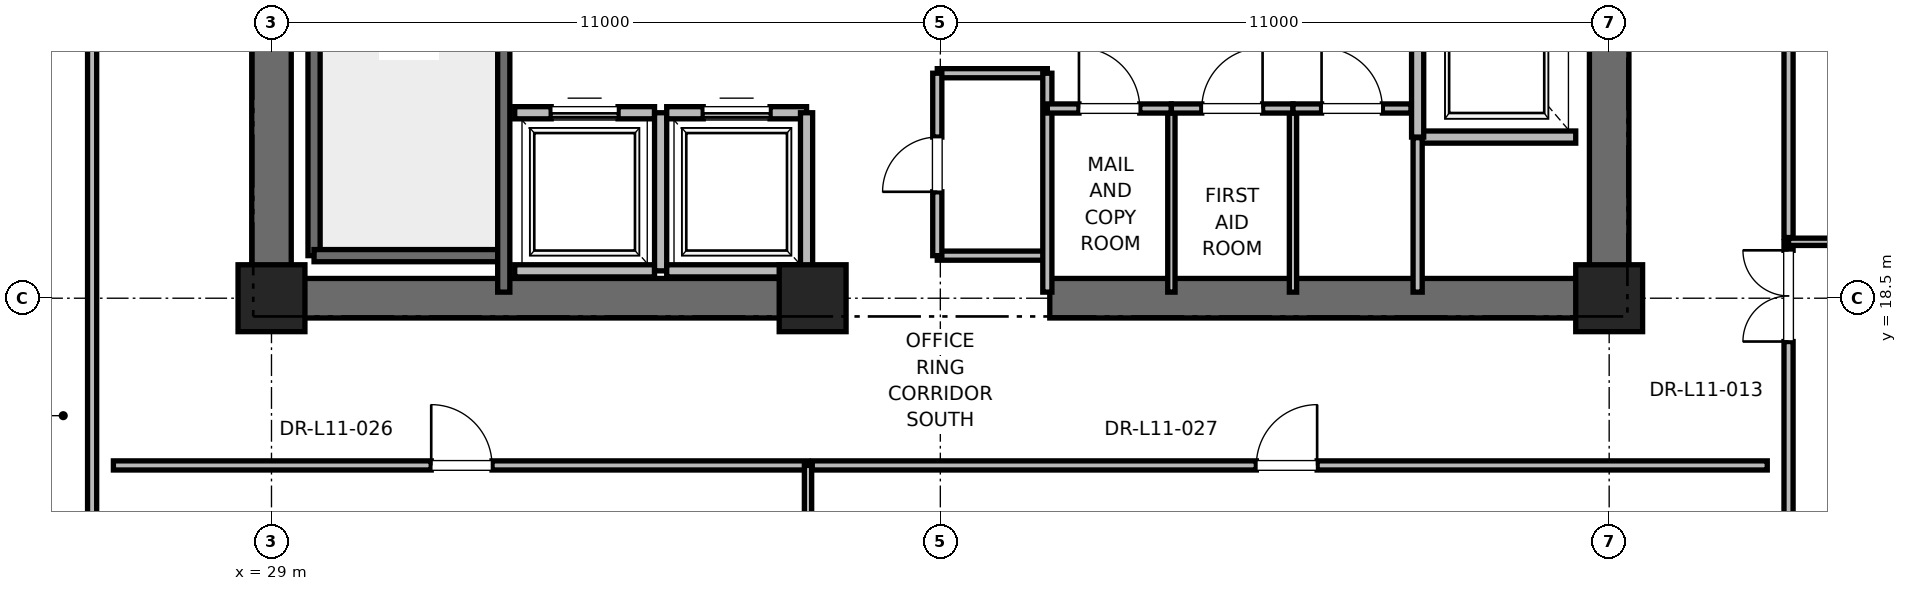
"""IFC4 building model, lengths in metres.
Left out: names, types, materials, properties, quantities, classifications, styles, units other than length and angle.
Written with IfcOpenShell. Run it as: python <this file> out.ifc"""

import sys

from ifc_helpers import new_model, si_unit, direction, frame, frame_2d, origin, origin_2d, place, context, subcontext, project, spatial, rectangle, extrude, element, fill, save


model = new_model("IFC4")
c1 = context("Model", 3, precision=1e-05, world=origin(), true_north=direction((0.0, 1.0)))
c2 = subcontext(c1, "Body", "Model", "MODEL_VIEW")
j1 = project(units=[si_unit("LENGTHUNIT", "METRE"), si_unit("PLANEANGLEUNIT", "RADIAN")], contexts=[c1])
p1 = place(None, origin())
s1 = spatial("IfcSite", under=j1, at=p1, CompositionType="ELEMENT")
p2 = place(p1, origin())
s2 = spatial("IfcBuilding", under=s1, at=p2, CompositionType="ELEMENT")
p3 = place(p2, frame((0.0, 0.0, 51.6)))
s3 = spatial("IfcBuildingStorey", under=s2, at=p3, CompositionType="ELEMENT", Elevation=51.6)
for number, where, z_axis, x_axis in (
    (1, (29.0, 18.5, 0.0), (0.0, 0.0, 1.0), (1.0, 0.0, 0.0)),
    (2, (51.0, 18.5, 0.0), (0.0, 0.0, 1.0), (1.0, 0.0, 0.0)),
    (3, (37.9, 18.5, 0.0), (0.0, 0.0, 1.0), (1.0, 0.0, 0.0)),
):
    element("IfcColumn", number, at=place(p3, frame(where, z_axis=z_axis, x_axis=x_axis)), inside=s3, PredefinedType="PILASTER", context=c2, shape_type="SweptSolid", body=[
        extrude(rectangle(XDim=1.1, YDim=1.1, at=origin_2d()), origin(), (0.0, 0.0, 1.0), 4.0),
    ])
for number, where, z_axis, x_axis in (
    (4, (29.0, 18.5, 0.0), (0.0, 0.0, 1.0), (1.0, 0.0, 0.0)),
    (5, (41.8, 18.5, 0.0), (0.0, 0.0, 1.0), (1.0, 0.0, 0.0)),
):
    element("IfcWall", number, at=place(p3, frame(where, z_axis=z_axis, x_axis=x_axis)), inside=s3, PredefinedType="SHEAR", context=c2, shape_type="SweptSolid", body=[
        extrude(rectangle(XDim=9.2, YDim=0.65, at=frame_2d((4.6, 0.0))), origin(), (0.0, 0.0, 1.0), 3.76),
    ])
p4 = place(p3, frame((29.0, 18.5, 0.0), z_axis=(0.0, 0.0, 1.0), x_axis=(0.0, 1.0, 0.0)))
e6 = element("IfcWall", 6, at=p4, inside=s3, PredefinedType="SHEAR", context=c2, shape_type="SweptSolid", body=[
    extrude(rectangle(XDim=8.8, YDim=0.65, at=frame_2d((4.4, 0.0))), origin(), (0.0, 0.0, 1.0), 3.76),
])
p5 = place(p3, frame((51.0, 18.5, 0.0), z_axis=(0.0, 0.0, 1.0), x_axis=(0.0, 1.0, 0.0)))
e7 = element("IfcWall", 7, at=p5, inside=s3, PredefinedType="SHEAR", context=c2, shape_type="SweptSolid", body=[
    extrude(rectangle(XDim=5.8, YDim=0.65, at=frame_2d((2.9, 0.0))), origin(), (0.0, 0.0, 1.0), 3.76),
])
p6 = place(p3, frame((29.7, 19.2, 0.0), z_axis=(0.0, 0.0, 1.0), x_axis=(0.0, 1.0, 0.0)))
e8 = element("IfcWall", 8, at=p6, inside=s3, PredefinedType="SOLIDWALL", context=c2, shape_type="SweptSolid", body=[
    extrude(rectangle(XDim=8.15, YDim=0.2, at=frame_2d((4.075, 0.0))), origin(), (0.0, 0.0, 1.0), 3.76),
])
p7 = place(p3, frame((29.7, 19.2, 0.0), z_axis=(0.0, 0.0, 1.0), x_axis=(1.0, 0.0, 0.0)))
e9 = element("IfcWall", 9, at=p7, inside=s3, PredefinedType="SOLIDWALL", context=c2, shape_type="SweptSolid", body=[
    extrude(rectangle(XDim=3.12, YDim=0.2, at=frame_2d((1.56, 0.0))), origin(), (0.0, 0.0, 1.0), 3.76),
])
p8 = place(p3, frame((32.82, 18.6, 0.0), z_axis=(0.0, 0.0, 1.0), x_axis=(0.0, 1.0, 0.0)))
e10 = element("IfcWall", 10, at=p8, inside=s3, PredefinedType="SOLIDWALL", context=c2, shape_type="SweptSolid", body=[
    extrude(rectangle(XDim=8.78, YDim=0.2, at=frame_2d((4.39, 0.0))), origin(), (0.0, 0.0, 1.0), 3.76),
])
p9 = place(p3, frame((47.85, 21.15, 0.0), z_axis=(0.0, 0.0, 1.0), x_axis=(1.0, 0.0, 0.0)))
e11 = element("IfcWall", 11, at=p9, inside=s3, PredefinedType="SOLIDWALL", context=c2, shape_type="SweptSolid", body=[
    extrude(rectangle(XDim=2.6, YDim=0.2, at=frame_2d((1.3, 0.0))), origin(), (0.0, 0.0, 1.0), 3.76),
])
p10 = place(p3, frame((47.85, 24.15, 0.0), z_axis=(0.0, 0.0, 1.0), x_axis=(0.0, -1.0, 0.0)))
e12 = element("IfcWall", 12, at=p10, inside=s3, PredefinedType="SOLIDWALL", context=c2, shape_type="SweptSolid", body=[
    extrude(rectangle(XDim=3.0, YDim=0.2, at=frame_2d((1.5, 0.0))), origin(), (0.0, 0.0, 1.0), 3.76),
])
p11 = place(p3, frame((33.0, 18.95, 0.0), z_axis=(0.0, 0.0, 1.0), x_axis=(1.0, 0.0, 0.0)))
e13 = element("IfcWall", 13, at=p11, inside=s3, PredefinedType="SOLIDWALL", context=c2, shape_type="SweptSolid", body=[
    extrude(rectangle(XDim=2.3, YDim=0.2, at=frame_2d((1.15, 0.0))), origin(), (0.0, 0.0, 1.0), 3.76),
])
p12 = place(p3, frame((35.3, 21.55, 0.0), z_axis=(0.0, 0.0, 1.0), x_axis=(-1.0, 0.0, 0.0)))
e14 = element("IfcWall", 14, at=p12, inside=s3, PredefinedType="SOLIDWALL", context=c2, shape_type="SweptSolid", body=[
    extrude(rectangle(XDim=2.3, YDim=0.2, at=frame_2d((1.15, 0.0))), origin(), (0.0, 0.0, 1.0), 3.76),
])
p13 = place(p12, frame((0.6, 0.0, 0.0)))
e15 = element("IfcOpeningElement", 15, at=p13, cuts=e14, PredefinedType="OPENING", context=c2, shape_type="SweptSolid", body=[
    extrude(rectangle(XDim=1.1, YDim=2.2, at=frame_2d((0.55, 1.1))), frame((0.0, 0.1, 0.0), z_axis=(0.0, -1.0, 0.0), x_axis=(1.0, 0.0, 0.0)), (0.0, 0.0, 1.0), 0.2),
])
p14 = place(p3, frame((35.4, 18.95, 0.0), z_axis=(0.0, 0.0, 1.0), x_axis=(0.0, 1.0, 0.0)))
e16 = element("IfcWall", 16, at=p14, inside=s3, PredefinedType="SOLIDWALL", context=c2, shape_type="SweptSolid", body=[
    extrude(rectangle(XDim=2.6, YDim=0.2, at=frame_2d((1.3, 0.0))), origin(), (0.0, 0.0, 1.0), 3.76),
])
p15 = place(p3, frame((35.5, 18.95, 0.0), z_axis=(0.0, 0.0, 1.0), x_axis=(1.0, 0.0, 0.0)))
e17 = element("IfcWall", 17, at=p15, inside=s3, PredefinedType="SOLIDWALL", context=c2, shape_type="SweptSolid", body=[
    extrude(rectangle(XDim=2.3, YDim=0.2, at=frame_2d((1.15, 0.0))), origin(), (0.0, 0.0, 1.0), 2.54),
])
p16 = place(p3, frame((37.8, 21.55, 0.0), z_axis=(0.0, 0.0, 1.0), x_axis=(-1.0, 0.0, 0.0)))
e18 = element("IfcWall", 18, at=p16, inside=s3, PredefinedType="SOLIDWALL", context=c2, shape_type="SweptSolid", body=[
    extrude(rectangle(XDim=2.3, YDim=0.2, at=frame_2d((1.15, 0.0))), origin(), (0.0, 0.0, 1.0), 3.76),
])
p17 = place(p16, frame((0.6, 0.0, 0.0)))
e19 = element("IfcOpeningElement", 19, at=p17, cuts=e18, PredefinedType="OPENING", context=c2, shape_type="SweptSolid", body=[
    extrude(rectangle(XDim=1.1, YDim=2.2, at=frame_2d((0.55, 1.1))), frame((0.0, 0.1, 0.0), z_axis=(0.0, -1.0, 0.0), x_axis=(1.0, 0.0, 0.0)), (0.0, 0.0, 1.0), 0.2),
])
p18 = place(p3, frame((37.8, 18.95, 0.0), z_axis=(0.0, 0.0, 1.0), x_axis=(0.0, 1.0, 0.0)))
e20 = element("IfcWall", 20, at=p18, inside=s3, PredefinedType="SOLIDWALL", context=c2, shape_type="SweptSolid", body=[
    extrude(rectangle(XDim=2.6, YDim=0.2, at=frame_2d((1.3, 0.0))), origin(), (0.0, 0.0, 1.0), 2.54),
])
for number, where, z_axis, x_axis in (
    (21, (39.95, 19.2, 0.0), (0.0, 0.0, 1.0), (1.0, 0.0, 0.0)),
    (22, (39.95, 22.2, 0.0), (0.0, 0.0, 1.0), (1.0, 0.0, 0.0)),
):
    element("IfcWall", number, at=place(p3, frame(where, z_axis=z_axis, x_axis=x_axis)), inside=s3, PredefinedType="PARTITIONING", context=c2, shape_type="SweptSolid", body=[
        extrude(rectangle(XDim=1.81, YDim=0.15, at=frame_2d((0.905, 0.0))), origin(), (0.0, 0.0, 1.0), 2.85),
    ])
p19 = place(p3, frame((41.76, 18.6, 0.0), z_axis=(0.0, 0.0, 1.0), x_axis=(0.0, 1.0, 0.0)))
e23 = element("IfcWall", 23, at=p19, inside=s3, PredefinedType="PARTITIONING", context=c2, shape_type="SweptSolid", body=[
    extrude(rectangle(XDim=3.6, YDim=0.15, at=frame_2d((1.8, 0.0))), origin(), (0.0, 0.0, 1.0), 2.54),
])
p20 = place(p3, frame((39.95, 19.2, 0.0), z_axis=(0.0, 0.0, 1.0), x_axis=(0.0, 1.0, 0.0)))
e24 = element("IfcWall", 24, at=p20, inside=s3, PredefinedType="PARTITIONING", context=c2, shape_type="SweptSolid", body=[
    extrude(rectangle(XDim=3.0, YDim=0.15, at=frame_2d((1.5, 0.0))), origin(), (0.0, 0.0, 1.0), 2.85),
])
p21 = place(p20, frame((1.05, 0.0, 0.0)))
e25 = element("IfcOpeningElement", 25, at=p21, cuts=e24, PredefinedType="OPENING", context=c2, shape_type="SweptSolid", body=[
    extrude(rectangle(XDim=0.9, YDim=2.1, at=frame_2d((0.45, 1.05))), frame((0.0, 0.075, 0.0), z_axis=(0.0, -1.0, 0.0), x_axis=(1.0, 0.0, 0.0)), (0.0, 0.0, 1.0), 0.15),
])
p22 = place(p3, frame((47.85, 18.6, 0.0), z_axis=(0.0, 0.0, 1.0), x_axis=(0.0, 1.0, 0.0)))
e26 = element("IfcWall", 26, at=p22, inside=s3, PredefinedType="PARTITIONING", context=c2, shape_type="SweptSolid", body=[
    extrude(rectangle(XDim=2.54, YDim=0.15, at=frame_2d((1.27, 0.0))), origin(), (0.0, 0.0, 1.0), 2.85),
])
for number, where, z_axis, x_axis in (
    (27, (43.8, 18.6, 0.0), (0.0, 0.0, 1.0), (0.0, 1.0, 0.0)),
    (28, (45.8, 18.6, 0.0), (0.0, 0.0, 1.0), (0.0, 1.0, 0.0)),
):
    element("IfcWall", number, at=place(p3, frame(where, z_axis=z_axis, x_axis=x_axis)), inside=s3, PredefinedType="PARTITIONING", context=c2, shape_type="SweptSolid", body=[
        extrude(rectangle(XDim=3.02, YDim=0.12, at=frame_2d((1.51, 0.0))), origin(), (0.0, 0.0, 1.0), 2.85),
    ])
p23 = place(p3, frame((41.76, 21.62, 0.0), z_axis=(0.0, 0.0, 1.0), x_axis=(1.0, 0.0, 0.0)))
e29 = element("IfcWall", 29, at=p23, inside=s3, PredefinedType="PARTITIONING", context=c2, shape_type="SweptSolid", body=[
    extrude(rectangle(XDim=2.04, YDim=0.15, at=frame_2d((1.02, 0.0))), origin(), (0.0, 0.0, 1.0), 2.85),
])
p24 = place(p23, frame((0.52, 0.0, 0.0)))
e30 = element("IfcOpeningElement", 30, at=p24, cuts=e29, PredefinedType="OPENING", context=c2, shape_type="SweptSolid", body=[
    extrude(rectangle(XDim=1.0, YDim=2.15, at=frame_2d((0.5, 1.075))), frame((0.0, 0.075, 0.0), z_axis=(0.0, -1.0, 0.0), x_axis=(1.0, 0.0, 0.0)), (0.0, 0.0, 1.0), 0.15),
])
p25 = place(p3, frame((43.8, 21.62, 0.0), z_axis=(0.0, 0.0, 1.0), x_axis=(1.0, 0.0, 0.0)))
e31 = element("IfcWall", 31, at=p25, inside=s3, PredefinedType="PARTITIONING", context=c2, shape_type="SweptSolid", body=[
    extrude(rectangle(XDim=2.0, YDim=0.15, at=frame_2d((1.0, 0.0))), origin(), (0.0, 0.0, 1.0), 2.85),
])
p26 = place(p25, frame((0.5, 0.0, 0.0)))
e32 = element("IfcOpeningElement", 32, at=p26, cuts=e31, PredefinedType="OPENING", context=c2, shape_type="SweptSolid", body=[
    extrude(rectangle(XDim=1.0, YDim=2.15, at=frame_2d((0.5, 1.075))), frame((0.0, 0.075, 0.0), z_axis=(0.0, -1.0, 0.0), x_axis=(1.0, 0.0, 0.0)), (0.0, 0.0, 1.0), 0.15),
])
p27 = place(p3, frame((45.8, 21.62, 0.0), z_axis=(0.0, 0.0, 1.0), x_axis=(1.0, 0.0, 0.0)))
e33 = element("IfcWall", 33, at=p27, inside=s3, PredefinedType="PARTITIONING", context=c2, shape_type="SweptSolid", body=[
    extrude(rectangle(XDim=1.94, YDim=0.15, at=frame_2d((0.97, 0.0))), origin(), (0.0, 0.0, 1.0), 2.85),
])
p28 = place(p27, frame((0.47, 0.0, 0.0)))
e34 = element("IfcOpeningElement", 34, at=p28, cuts=e33, PredefinedType="OPENING", context=c2, shape_type="SweptSolid", body=[
    extrude(rectangle(XDim=1.0, YDim=2.15, at=frame_2d((0.5, 1.075))), frame((0.0, 0.075, 0.0), z_axis=(0.0, -1.0, 0.0), x_axis=(1.0, 0.0, 0.0)), (0.0, 0.0, 1.0), 0.15),
])
p29 = place(p3, frame((26.4, 15.75, 0.0), z_axis=(0.0, 0.0, 1.0), x_axis=(1.0, 0.0, 0.0)))
e35 = element("IfcWall", 35, at=p29, inside=s3, PredefinedType="PARTITIONING", context=c2, shape_type="SweptSolid", body=[
    extrude(rectangle(XDim=11.424, YDim=0.15, at=frame_2d((5.712, 0.0))), origin(), (0.0, 0.0, 1.0), 2.85),
])
p30 = place(p29, frame((5.227, 0.0, 0.0)))
e36 = element("IfcOpeningElement", 36, at=p30, cuts=e35, PredefinedType="OPENING", context=c2, shape_type="SweptSolid", body=[
    extrude(rectangle(XDim=1.0, YDim=2.15, at=frame_2d((0.5, 1.075))), frame((0.0, 0.075, 0.0), z_axis=(0.0, -1.0, 0.0), x_axis=(1.0, 0.0, 0.0)), (0.0, 0.0, 1.0), 0.15),
])
p31 = place(p3, frame((37.824, 5.454, 0.0), z_axis=(0.0, 0.0, 1.0), x_axis=(0.0, 1.0, 0.0)))
e37 = element("IfcWall", 37, at=p31, inside=s3, PredefinedType="PARTITIONING", context=c2, shape_type="SweptSolid", body=[
    extrude(rectangle(XDim=10.296, YDim=0.12, at=frame_2d((5.148, 0.0))), origin(), (0.0, 0.0, 1.0), 2.39),
])
p32 = place(p3, frame((37.894, 15.75, 0.0), z_axis=(0.0, 0.0, 1.0), x_axis=(1.0, 0.0, 0.0)))
e38 = element("IfcWall", 38, at=p32, inside=s3, PredefinedType="PARTITIONING", context=c2, shape_type="SweptSolid", body=[
    extrude(rectangle(XDim=15.706, YDim=0.15, at=frame_2d((7.853, 0.0))), origin(), (0.0, 0.0, 1.0), 2.85),
])
p33 = place(p32, frame((7.303, 0.0, 0.0)))
e39 = element("IfcOpeningElement", 39, at=p33, cuts=e38, PredefinedType="OPENING", context=c2, shape_type="SweptSolid", body=[
    extrude(rectangle(XDim=1.0, YDim=2.15, at=frame_2d((0.5, 1.075))), frame((0.0, 0.075, 0.0), z_axis=(0.0, -1.0, 0.0), x_axis=(1.0, 0.0, 0.0)), (0.0, 0.0, 1.0), 0.15),
])
p34 = place(p3, frame((26.05, 9.154, 0.0), z_axis=(0.0, 0.0, 1.0), x_axis=(0.0, 1.0, 0.0)))
e40 = element("IfcWall", 40, at=p34, inside=s3, PredefinedType="PARTITIONING", context=c2, shape_type="SweptSolid", body=[
    extrude(rectangle(XDim=21.281, YDim=0.15, at=frame_2d((10.641, 0.0))), origin(), (0.0, 0.0, 1.0), 2.85),
])
p35 = place(p34, frame((14.829, 0.0, 0.0)))
e41 = element("IfcOpeningElement", 41, at=p35, cuts=e40, PredefinedType="OPENING", context=c2, shape_type="SweptSolid", body=[
    extrude(rectangle(XDim=1.0, YDim=2.15, at=frame_2d((0.5, 1.075))), frame((0.0, 0.075, 0.0), z_axis=(0.0, -1.0, 0.0), x_axis=(1.0, 0.0, 0.0)), (0.0, 0.0, 1.0), 0.15),
])
p36 = place(p3, frame((53.95, 9.154, 0.0), z_axis=(0.0, 0.0, 1.0), x_axis=(0.0, 1.0, 0.0)))
e42 = element("IfcWall", 42, at=p36, inside=s3, PredefinedType="PARTITIONING", context=c2, shape_type="SweptSolid", body=[
    extrude(rectangle(XDim=10.274, YDim=0.15, at=frame_2d((5.137, 0.0))), origin(), (0.0, 0.0, 1.0), 2.85),
])
p37 = place(p36, frame((8.634, 0.0, 0.0)))
e43 = element("IfcOpeningElement", 43, at=p37, cuts=e42, PredefinedType="OPENING", context=c2, shape_type="SweptSolid", body=[
    extrude(rectangle(XDim=1.5, YDim=2.25, at=frame_2d((0.75, 1.125))), frame((0.0, 0.075, 0.0), z_axis=(0.0, -1.0, 0.0), x_axis=(1.0, 0.0, 0.0)), (0.0, 0.0, 1.0), 0.15),
])
p38 = place(p3, frame((53.95, 19.428, 0.0), z_axis=(0.0, 0.0, 1.0), x_axis=(1.0, 0.0, 0.0)))
e44 = element("IfcWall", 44, at=p38, inside=s3, PredefinedType="PARTITIONING", context=c2, shape_type="SweptSolid", body=[
    extrude(rectangle(XDim=11.53, YDim=0.12, at=frame_2d((5.765, 0.0))), origin(), (0.0, 0.0, 1.0), 2.85),
])
p39 = place(p3, frame((53.95, 19.498, 0.0), z_axis=(0.0, 0.0, 1.0), x_axis=(0.0, 1.0, 0.0)))
e45 = element("IfcWall", 45, at=p39, inside=s3, PredefinedType="PARTITIONING", context=c2, shape_type="SweptSolid", body=[
    extrude(rectangle(XDim=12.405, YDim=0.15, at=frame_2d((6.203, 0.0))), origin(), (0.0, 0.0, 1.0), 2.85),
])
p40 = place(p39, frame((5.668, 0.0, 0.0)))
e46 = element("IfcOpeningElement", 46, at=p40, cuts=e45, PredefinedType="OPENING", context=c2, shape_type="SweptSolid", body=[
    extrude(rectangle(XDim=1.0, YDim=2.15, at=frame_2d((0.5, 1.075))), frame((0.0, 0.075, 0.0), z_axis=(0.0, -1.0, 0.0), x_axis=(1.0, 0.0, 0.0)), (0.0, 0.0, 1.0), 0.15),
])
p41 = place(p13, origin())
e47 = element("IfcDoor", 47, at=p41, inside=s3, OperationType="SLIDING_TO_RIGHT", PredefinedType="DOOR", context=c2, shape_type="SweptSolid", body=[
    extrude(rectangle(XDim=1.1, YDim=2.2, at=frame_2d((0.55, 1.1))), frame((0.0, 0.025, 0.0), z_axis=(0.0, -1.0, 0.0), x_axis=(1.0, 0.0, 0.0)), (0.0, 0.0, 1.0), 0.05),
])
fill(e15, e47)
p42 = place(p17, origin())
e48 = element("IfcDoor", 48, at=p42, inside=s3, OperationType="SLIDING_TO_RIGHT", PredefinedType="DOOR", context=c2, shape_type="SweptSolid", body=[
    extrude(rectangle(XDim=1.1, YDim=2.2, at=frame_2d((0.55, 1.1))), frame((0.0, 0.025, 0.0), z_axis=(0.0, -1.0, 0.0), x_axis=(1.0, 0.0, 0.0)), (0.0, 0.0, 1.0), 0.05),
])
fill(e19, e48)
p43 = place(p21, origin())
e49 = element("IfcDoor", 49, at=p43, inside=s3, OperationType="SINGLE_SWING_LEFT", PredefinedType="DOOR", context=c2, shape_type="SweptSolid", body=[
    extrude(rectangle(XDim=0.9, YDim=2.1, at=frame_2d((0.45, 1.05))), frame((0.0, 0.025, 0.0), z_axis=(0.0, -1.0, 0.0), x_axis=(1.0, 0.0, 0.0)), (0.0, 0.0, 1.0), 0.05),
])
fill(e25, e49)
p44 = place(p24, origin())
e50 = element("IfcDoor", 50, at=p44, inside=s3, OperationType="SINGLE_SWING_LEFT", PredefinedType="DOOR", context=c2, shape_type="SweptSolid", body=[
    extrude(rectangle(XDim=1.0, YDim=2.15, at=frame_2d((0.5, 1.075))), frame((0.0, 0.025, 0.0), z_axis=(0.0, -1.0, 0.0), x_axis=(1.0, 0.0, 0.0)), (0.0, 0.0, 1.0), 0.05),
])
fill(e30, e50)
p45 = place(p26, origin())
e51 = element("IfcDoor", 51, at=p45, inside=s3, OperationType="SINGLE_SWING_RIGHT", PredefinedType="DOOR", context=c2, shape_type="SweptSolid", body=[
    extrude(rectangle(XDim=1.0, YDim=2.15, at=frame_2d((0.5, 1.075))), frame((0.0, 0.025, 0.0), z_axis=(0.0, -1.0, 0.0), x_axis=(1.0, 0.0, 0.0)), (0.0, 0.0, 1.0), 0.05),
])
fill(e32, e51)
p46 = place(p28, origin())
e52 = element("IfcDoor", 52, at=p46, inside=s3, OperationType="SINGLE_SWING_LEFT", PredefinedType="DOOR", context=c2, shape_type="SweptSolid", body=[
    extrude(rectangle(XDim=1.0, YDim=2.15, at=frame_2d((0.5, 1.075))), frame((0.0, 0.025, 0.0), z_axis=(0.0, -1.0, 0.0), x_axis=(1.0, 0.0, 0.0)), (0.0, 0.0, 1.0), 0.05),
])
fill(e34, e52)
p47 = place(p30, origin())
e53 = element("IfcDoor", 53, at=p47, inside=s3, OperationType="SINGLE_SWING_LEFT", PredefinedType="DOOR", context=c2, shape_type="SweptSolid", body=[
    extrude(rectangle(XDim=1.0, YDim=2.15, at=frame_2d((0.5, 1.075))), frame((0.0, 0.025, 0.0), z_axis=(0.0, -1.0, 0.0), x_axis=(1.0, 0.0, 0.0)), (0.0, 0.0, 1.0), 0.05),
])
fill(e36, e53)
p48 = place(p33, origin())
e54 = element("IfcDoor", 54, at=p48, inside=s3, OperationType="SINGLE_SWING_RIGHT", PredefinedType="DOOR", context=c2, shape_type="SweptSolid", body=[
    extrude(rectangle(XDim=1.0, YDim=2.15, at=frame_2d((0.5, 1.075))), frame((0.0, 0.025, 0.0), z_axis=(0.0, -1.0, 0.0), x_axis=(1.0, 0.0, 0.0)), (0.0, 0.0, 1.0), 0.05),
])
fill(e39, e54)
p49 = place(p37, origin())
e55 = element("IfcDoor", 55, at=p49, inside=s3, OperationType="DOUBLE_DOOR_SINGLE_SWING", PredefinedType="DOOR", context=c2, shape_type="SweptSolid", body=[
    extrude(rectangle(XDim=1.5, YDim=2.25, at=frame_2d((0.75, 1.125))), frame((0.0, 0.025, 0.0), z_axis=(0.0, -1.0, 0.0), x_axis=(1.0, 0.0, 0.0)), (0.0, 0.0, 1.0), 0.05),
])
fill(e43, e55)
save(model, sys.argv[1])
